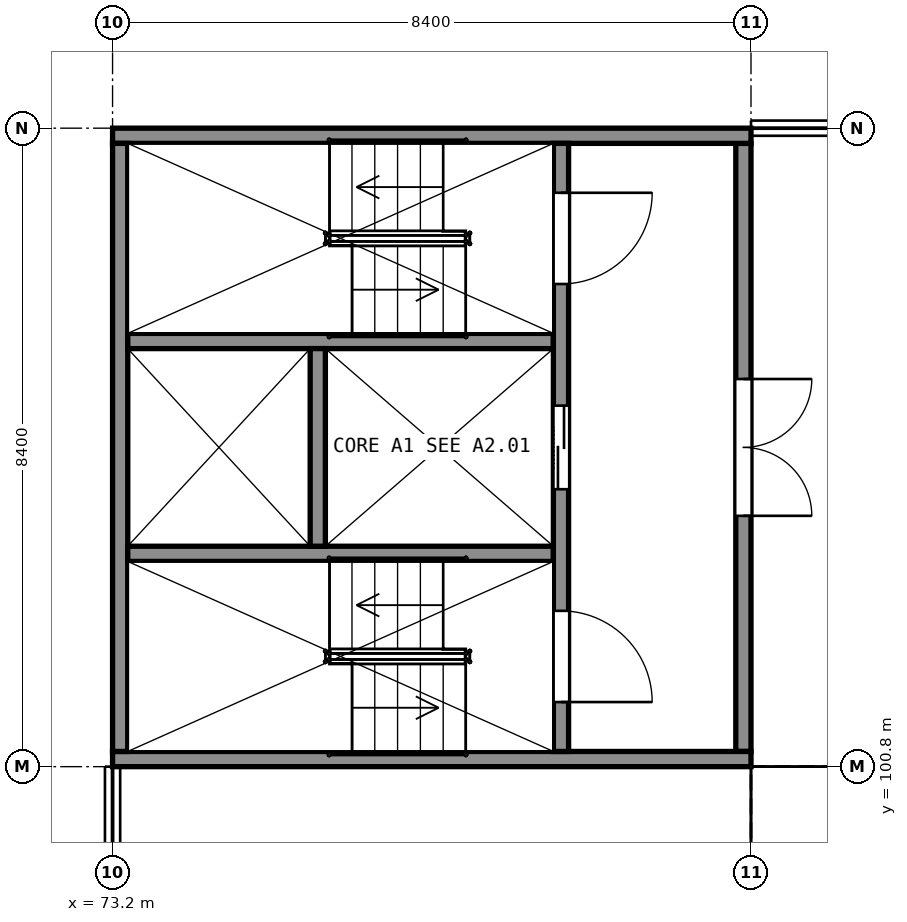
"""IFC4 building model, lengths in metres.
Left out: names, types, materials, properties, quantities, classifications, styles, units other than length and angle.
Written with IfcOpenShell. Run it as: python <this file> out.ifc"""

import sys

from ifc_helpers import new_model, si_unit, direction, frame, frame_2d, origin, place, context, subcontext, project, spatial, rectangle, extrude, element, fill, save


model = new_model("IFC4")
c1 = context("Model", 3, precision=1e-05, world=origin(), true_north=direction((0.0, 1.0)))
c2 = subcontext(c1, "Body", "Model", "MODEL_VIEW")
j1 = project(units=[si_unit("LENGTHUNIT", "METRE"), si_unit("PLANEANGLEUNIT", "RADIAN")], contexts=[c1])
p1 = place(None, origin())
s1 = spatial("IfcSite", under=j1, at=p1, CompositionType="ELEMENT")
p2 = place(p1, origin())
s2 = spatial("IfcBuilding", under=s1, at=p2, CompositionType="ELEMENT")
p3 = place(p2, frame((0.0, 0.0, 25.0)))
s3 = spatial("IfcBuildingStorey", under=s2, at=p3, CompositionType="ELEMENT", Elevation=25.0)
for number, where, z_axis, x_axis in (
    (1, (73.2, 100.9, 0.0), (0.0, 0.0, 1.0), (1.0, 0.0, 0.0)),
    (2, (73.2, 109.1, 0.0), (0.0, 0.0, 1.0), (1.0, 0.0, 0.0)),
):
    element("IfcWall", number, at=place(p3, frame(where, z_axis=z_axis, x_axis=x_axis)), inside=s3, PredefinedType="SHEAR", context=c2, shape_type="SweptSolid", body=[
        extrude(rectangle(XDim=8.4, YDim=0.2, at=frame_2d((4.2, 0.0))), origin(), (0.0, 0.0, 1.0), 5.0),
    ])
p4 = place(p3, frame((73.3, 101.0, 0.0), z_axis=(0.0, 0.0, 1.0), x_axis=(0.0, 1.0, 0.0)))
e3 = element("IfcWall", 3, at=p4, inside=s3, PredefinedType="SHEAR", context=c2, shape_type="SweptSolid", body=[
    extrude(rectangle(XDim=8.0, YDim=0.2, at=frame_2d((4.0, 0.0))), origin(), (0.0, 0.0, 1.0), 5.0),
])
p5 = place(p3, frame((81.5, 101.0, 0.0), z_axis=(0.0, 0.0, 1.0), x_axis=(0.0, 1.0, 0.0)))
e4 = element("IfcWall", 4, at=p5, inside=s3, PredefinedType="SHEAR", context=c2, shape_type="SweptSolid", body=[
    extrude(rectangle(XDim=8.0, YDim=0.2, at=frame_2d((4.0, 0.0))), origin(), (0.0, 0.0, 1.0), 5.0),
])
p6 = place(p5, frame((3.1, 0.0, 0.0)))
e5 = element("IfcOpeningElement", 5, at=p6, cuts=e4, PredefinedType="OPENING", context=c2, shape_type="SweptSolid", body=[
    extrude(rectangle(XDim=1.8, YDim=2.1, at=frame_2d((0.9, 1.05))), frame((0.0, 0.11, 0.0), z_axis=(0.0, -1.0, 0.0), x_axis=(1.0, 0.0, 0.0)), (0.0, 0.0, 1.0), 0.22),
])
p7 = place(p3, frame((79.1, 101.0, 0.0), z_axis=(0.0, 0.0, 1.0), x_axis=(0.0, 1.0, 0.0)))
e6 = element("IfcWall", 6, at=p7, inside=s3, PredefinedType="SHEAR", context=c2, shape_type="SweptSolid", body=[
    extrude(rectangle(XDim=8.0, YDim=0.2, at=frame_2d((4.0, 0.0))), origin(), (0.0, 0.0, 1.0), 5.0),
])
p8 = place(p7, frame((0.65, 0.0, 0.0)))
e7 = element("IfcOpeningElement", 7, at=p8, cuts=e6, PredefinedType="OPENING", context=c2, shape_type="SweptSolid", body=[
    extrude(rectangle(XDim=1.2, YDim=2.1, at=frame_2d((0.6, 1.05))), frame((0.0, 0.11, 0.0), z_axis=(0.0, -1.0, 0.0), x_axis=(1.0, 0.0, 0.0)), (0.0, 0.0, 1.0), 0.22),
])
p9 = place(p7, frame((6.15, 0.0, 0.0)))
e8 = element("IfcOpeningElement", 8, at=p9, cuts=e6, PredefinedType="OPENING", context=c2, shape_type="SweptSolid", body=[
    extrude(rectangle(XDim=1.2, YDim=2.1, at=frame_2d((0.6, 1.05))), frame((0.0, 0.11, 0.0), z_axis=(0.0, -1.0, 0.0), x_axis=(1.0, 0.0, 0.0)), (0.0, 0.0, 1.0), 0.22),
])
p10 = place(p7, frame((3.45, 0.0, 0.0)))
e9 = element("IfcOpeningElement", 9, at=p10, cuts=e6, PredefinedType="OPENING", context=c2, shape_type="SweptSolid", body=[
    extrude(rectangle(XDim=1.1, YDim=2.1, at=frame_2d((0.55, 1.05))), frame((0.0, 0.11, 0.0), z_axis=(0.0, -1.0, 0.0), x_axis=(1.0, 0.0, 0.0)), (0.0, 0.0, 1.0), 0.22),
])
for number, where, z_axis, x_axis in (
    (10, (73.4, 103.6, 0.0), (0.0, 0.0, 1.0), (1.0, 0.0, 0.0)),
    (11, (73.4, 106.4, 0.0), (0.0, 0.0, 1.0), (1.0, 0.0, 0.0)),
):
    element("IfcWall", number, at=place(p3, frame(where, z_axis=z_axis, x_axis=x_axis)), inside=s3, PredefinedType="SHEAR", context=c2, shape_type="SweptSolid", body=[
        extrude(rectangle(XDim=5.6, YDim=0.2, at=frame_2d((2.8, 0.0))), origin(), (0.0, 0.0, 1.0), 5.0),
    ])
p11 = place(p3, frame((75.9, 103.7, 0.0), z_axis=(0.0, 0.0, 1.0), x_axis=(0.0, 1.0, 0.0)))
e12 = element("IfcWall", 12, at=p11, inside=s3, PredefinedType="SHEAR", context=c2, shape_type="SweptSolid", body=[
    extrude(rectangle(XDim=2.6, YDim=0.2, at=frame_2d((1.3, 0.0))), origin(), (0.0, 0.0, 1.0), 5.0),
])
p12 = place(p6, origin())
e13 = element("IfcDoor", 13, at=p12, inside=s3, OperationType="DOUBLE_DOOR_SINGLE_SWING", PredefinedType="DOOR", context=c2, shape_type="SweptSolid", body=[
    extrude(rectangle(XDim=1.8, YDim=2.1, at=frame_2d((0.9, 1.05))), frame((0.0, 0.025, 0.0), z_axis=(0.0, -1.0, 0.0), x_axis=(1.0, 0.0, 0.0)), (0.0, 0.0, 1.0), 0.05),
])
fill(e5, e13)
p13 = place(p8, origin())
e14 = element("IfcDoor", 14, at=p13, inside=s3, OperationType="SINGLE_SWING_LEFT", PredefinedType="DOOR", context=c2, shape_type="SweptSolid", body=[
    extrude(rectangle(XDim=1.2, YDim=2.1, at=frame_2d((0.6, 1.05))), frame((0.0, 0.025, 0.0), z_axis=(0.0, -1.0, 0.0), x_axis=(1.0, 0.0, 0.0)), (0.0, 0.0, 1.0), 0.05),
])
fill(e7, e14)
p14 = place(p9, origin())
e15 = element("IfcDoor", 15, at=p14, inside=s3, OperationType="SINGLE_SWING_RIGHT", PredefinedType="DOOR", context=c2, shape_type="SweptSolid", body=[
    extrude(rectangle(XDim=1.2, YDim=2.1, at=frame_2d((0.6, 1.05))), frame((0.0, 0.025, 0.0), z_axis=(0.0, -1.0, 0.0), x_axis=(1.0, 0.0, 0.0)), (0.0, 0.0, 1.0), 0.05),
])
fill(e8, e15)
p15 = place(p10, origin())
e16 = element("IfcDoor", 16, at=p15, inside=s3, OperationType="DOUBLE_DOOR_SLIDING", PredefinedType="DOOR", context=c2, shape_type="SweptSolid", body=[
    extrude(rectangle(XDim=1.1, YDim=2.1, at=frame_2d((0.55, 1.05))), frame((0.0, 0.025, 0.0), z_axis=(0.0, -1.0, 0.0), x_axis=(1.0, 0.0, 0.0)), (0.0, 0.0, 1.0), 0.05),
])
fill(e9, e16)
save(model, sys.argv[1])
